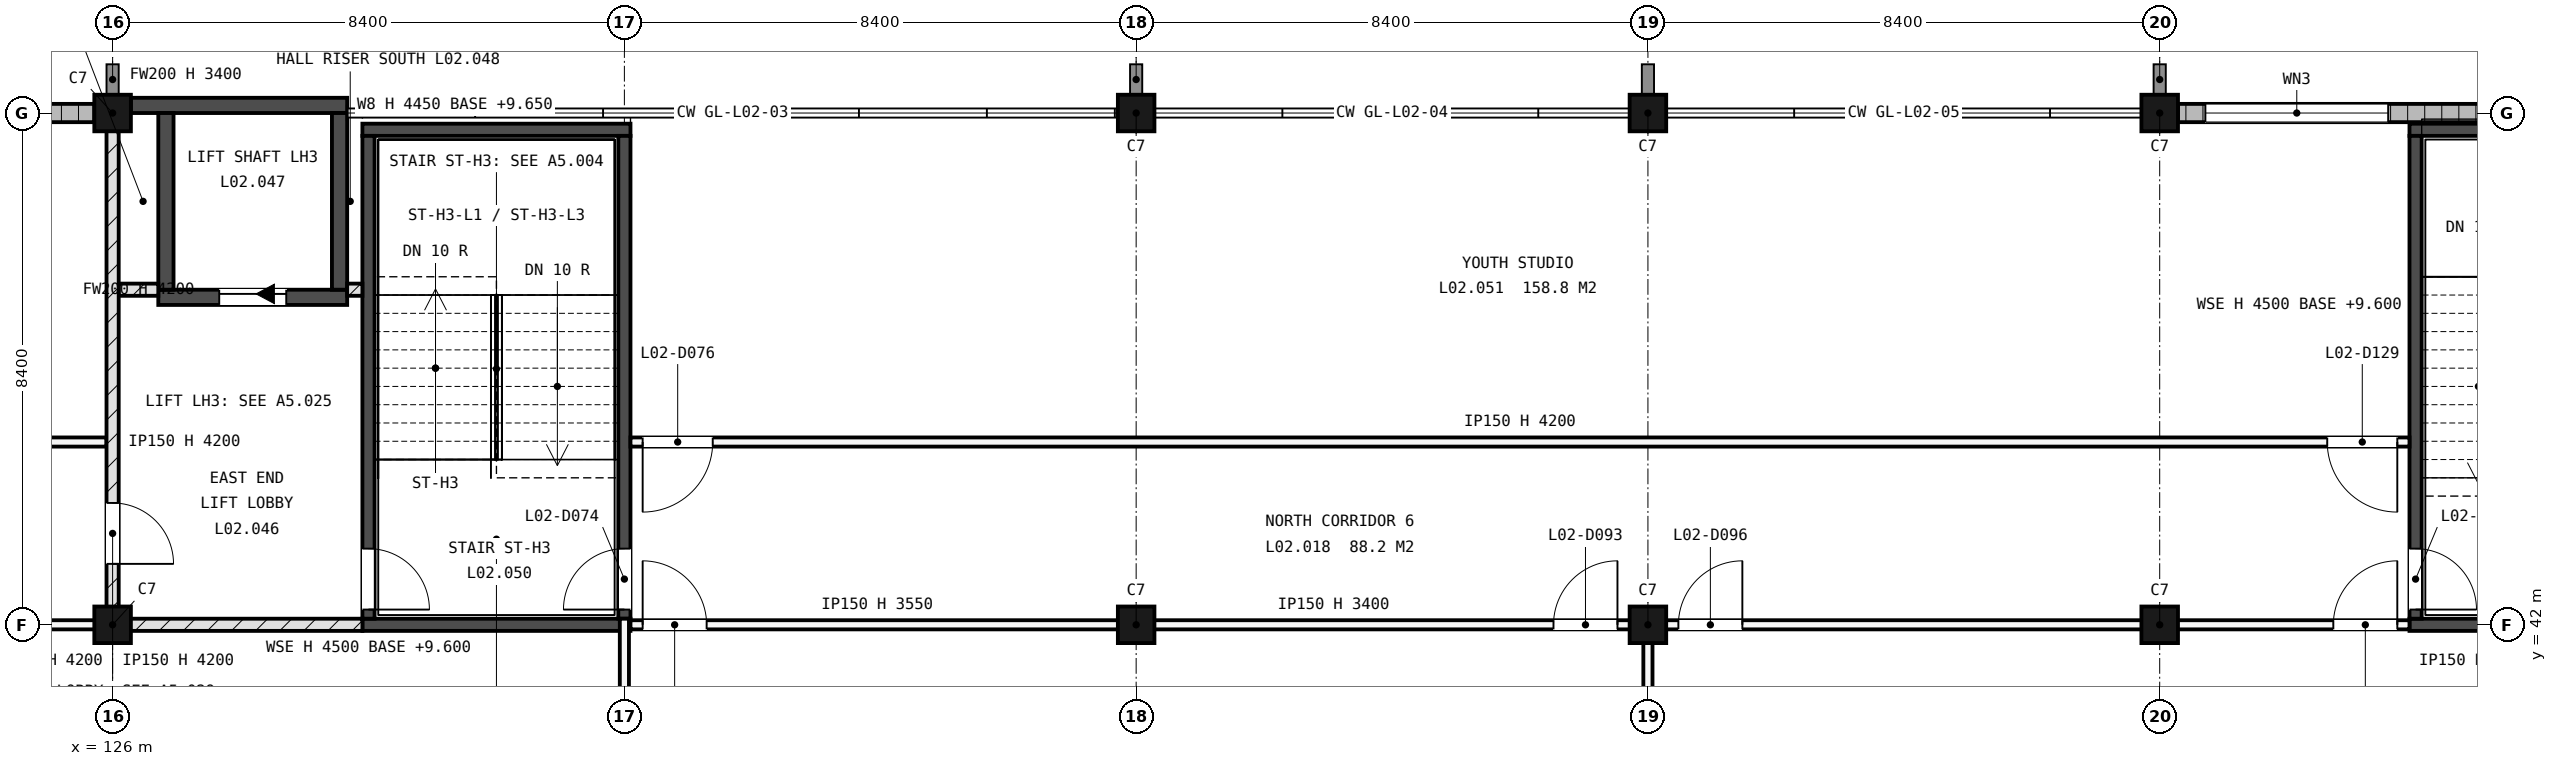
"""IFC4 building model, lengths in metres.
Left out: names, types, materials, properties, quantities, classifications, styles, units other than length and angle.
Written with IfcOpenShell. Run it as: python <this file> out.ifc"""

import sys

from ifc_helpers import new_model, si_unit, direction, frame, frame_2d, origin, origin_2d, place, context, subcontext, project, spatial, rectangle, extrude, element, fill, save


model = new_model("IFC4")
c1 = context("Model", 3, precision=1e-05, world=origin(), true_north=direction((0.0, 1.0)))
c2 = subcontext(c1, "Body", "Model", "MODEL_VIEW")
j1 = project(units=[si_unit("LENGTHUNIT", "METRE"), si_unit("PLANEANGLEUNIT", "RADIAN")], contexts=[c1])
p1 = place(None, origin())
s1 = spatial("IfcSite", under=j1, at=p1, CompositionType="ELEMENT")
p2 = place(p1, origin())
s2 = spatial("IfcBuilding", under=s1, at=p2, CompositionType="ELEMENT")
p3 = place(p2, frame((0.0, 0.0, 9.9)))
s3 = spatial("IfcBuildingStorey", under=s2, at=p3, CompositionType="ELEMENT", Elevation=9.9)
for number, where, z_axis, x_axis in (
    (1, (126.0, 42.0, -0.25), (0.0, 0.0, 1.0), (1.0, 0.0, 0.0)),
    (2, (126.0, 50.4, -0.25), (0.0, 0.0, 1.0), (1.0, 0.0, 0.0)),
    (3, (142.8, 42.0, -0.25), (0.0, 0.0, 1.0), (1.0, 0.0, 0.0)),
    (4, (142.8, 50.4, -0.25), (0.0, 0.0, 1.0), (1.0, 0.0, 0.0)),
    (5, (151.2, 42.0, -0.25), (0.0, 0.0, 1.0), (1.0, 0.0, 0.0)),
    (6, (151.2, 50.4, -0.25), (0.0, 0.0, 1.0), (1.0, 0.0, 0.0)),
    (7, (159.6, 42.0, -0.25), (0.0, 0.0, 1.0), (1.0, 0.0, 0.0)),
    (8, (159.6, 50.4, -0.25), (0.0, 0.0, 1.0), (1.0, 0.0, 0.0)),
):
    element("IfcColumn", number, at=place(p3, frame(where, z_axis=z_axis, x_axis=x_axis)), inside=s3, PredefinedType="COLUMN", context=c2, shape_type="SweptSolid", body=[
        extrude(rectangle(XDim=0.6, YDim=0.6, at=origin_2d()), origin(), (0.0, 0.0, 1.0), 4.45),
    ])
p4 = place(p3, frame((126.75, 47.375, -0.25), z_axis=(0.0, 0.0, 1.0), x_axis=(1.0, 0.0, 0.0)))
e9 = element("IfcWall", 9, at=p4, inside=s3, PredefinedType="SHEAR", context=c2, shape_type="SweptSolid", body=[
    extrude(rectangle(XDim=3.1, YDim=0.25, at=frame_2d((1.55, 0.0))), origin(), (0.0, 0.0, 1.0), 4.45),
])
p5 = place(p4, frame((1.0, 0.0, 0.25)))
e10 = element("IfcOpeningElement", 10, at=p5, cuts=e9, PredefinedType="OPENING", context=c2, shape_type="SweptSolid", body=[
    extrude(rectangle(XDim=1.1, YDim=2.1, at=frame_2d((0.55, 1.05))), frame((0.0, 0.135, 0.0), z_axis=(0.0, -1.0, 0.0), x_axis=(1.0, 0.0, 0.0)), (0.0, 0.0, 1.0), 0.27),
])
p6 = place(p3, frame((126.3, 50.525, -0.25), z_axis=(0.0, 0.0, 1.0), x_axis=(1.0, 0.0, 0.0)))
e11 = element("IfcWall", 11, at=p6, inside=s3, PredefinedType="SHEAR", context=c2, shape_type="SweptSolid", body=[
    extrude(rectangle(XDim=3.55, YDim=0.25, at=frame_2d((1.775, 0.0))), origin(), (0.0, 0.0, 1.0), 4.45),
])
for number, where, z_axis, x_axis in (
    (12, (126.875, 47.5, -0.25), (0.0, 0.0, 1.0), (0.0, 1.0, 0.0)),
    (13, (129.725, 47.5, -0.25), (0.0, 0.0, 1.0), (0.0, 1.0, 0.0)),
):
    element("IfcWall", number, at=place(p3, frame(where, z_axis=z_axis, x_axis=x_axis)), inside=s3, PredefinedType="SHEAR", context=c2, shape_type="SweptSolid", body=[
        extrude(rectangle(XDim=2.9, YDim=0.25, at=frame_2d((1.45, 0.0))), origin(), (0.0, 0.0, 1.0), 4.45),
    ])
p7 = place(p3, frame((109.5, 50.4, 0.0), z_axis=(0.0, 0.0, 1.0), x_axis=(1.0, 0.0, 0.0)))
e14 = element("IfcWall", 14, at=p7, inside=s3, PredefinedType="STANDARD", context=c2, shape_type="SweptSolid", body=[
    extrude(rectangle(XDim=16.2, YDim=0.3, at=frame_2d((8.1, 0.0))), origin(), (0.0, 0.0, 1.0), 3.55),
])
p8 = place(p7, frame((0.45, 0.0, 0.9)))
e15 = element("IfcOpeningElement", 15, at=p8, cuts=e14, PredefinedType="OPENING", context=c2, shape_type="SweptSolid", body=[
    extrude(rectangle(XDim=3.0, YDim=1.5, at=frame_2d((1.5, 0.75))), frame((0.0, 0.16, 0.0), z_axis=(0.0, -1.0, 0.0), x_axis=(1.0, 0.0, 0.0)), (0.0, 0.0, 1.0), 0.32),
])
p9 = place(p7, frame((10.05, 0.0, 0.9)))
e16 = element("IfcOpeningElement", 16, at=p9, cuts=e14, PredefinedType="OPENING", context=c2, shape_type="SweptSolid", body=[
    extrude(rectangle(XDim=4.2, YDim=1.5, at=frame_2d((2.1, 0.75))), frame((0.0, 0.16, 0.0), z_axis=(0.0, -1.0, 0.0), x_axis=(1.0, 0.0, 0.0)), (0.0, 0.0, 1.0), 0.32),
])
p10 = place(p3, frame((159.9, 50.4, 0.0), z_axis=(0.0, 0.0, 1.0), x_axis=(1.0, 0.0, 0.0)))
e17 = element("IfcWall", 17, at=p10, inside=s3, PredefinedType="STANDARD", context=c2, shape_type="SweptSolid", body=[
    extrude(rectangle(XDim=8.1, YDim=0.3, at=frame_2d((4.05, 0.0))), origin(), (0.0, 0.0, 1.0), 3.55),
])
p11 = place(p10, frame((0.45, 0.0, 0.9)))
e18 = element("IfcOpeningElement", 18, at=p11, cuts=e17, PredefinedType="OPENING", context=c2, shape_type="SweptSolid", body=[
    extrude(rectangle(XDim=3.0, YDim=1.5, at=frame_2d((1.5, 0.75))), frame((0.0, 0.16, 0.0), z_axis=(0.0, -1.0, 0.0), x_axis=(1.0, 0.0, 0.0)), (0.0, 0.0, 1.0), 0.32),
])
for number, where, z_axis, x_axis in (
    (19, (130.1, 42.0, -0.3), (0.0, 0.0, 1.0), (1.0, 0.0, 0.0)),
    (20, (130.1, 50.125, -0.3), (0.0, 0.0, 1.0), (1.0, 0.0, 0.0)),
):
    element("IfcWall", number, at=place(p3, frame(where, z_axis=z_axis, x_axis=x_axis)), inside=s3, PredefinedType="SHEAR", context=c2, shape_type="SweptSolid", body=[
        extrude(rectangle(XDim=4.4, YDim=0.2, at=frame_2d((2.2, 0.0))), origin(), (0.0, 0.0, 1.0), 4.5),
    ])
p12 = place(p3, frame((130.2, 42.1, -0.3), z_axis=(0.0, 0.0, 1.0), x_axis=(0.0, 1.0, 0.0)))
e21 = element("IfcWall", 21, at=p12, inside=s3, PredefinedType="SHEAR", context=c2, shape_type="SweptSolid", body=[
    extrude(rectangle(XDim=7.925, YDim=0.2, at=frame_2d((3.962, 0.0))), origin(), (0.0, 0.0, 1.0), 4.5),
])
p13 = place(p12, frame((0.15, 0.0, 0.3)))
e22 = element("IfcOpeningElement", 22, at=p13, cuts=e21, PredefinedType="OPENING", context=c2, shape_type="SweptSolid", body=[
    extrude(rectangle(XDim=1.0, YDim=2.1, at=frame_2d((0.5, 1.05))), frame((0.0, 0.11, 0.0), z_axis=(0.0, -1.0, 0.0), x_axis=(1.0, 0.0, 0.0)), (0.0, 0.0, 1.0), 0.22),
])
p14 = place(p3, frame((134.4, 42.1, -0.3), z_axis=(0.0, 0.0, 1.0), x_axis=(0.0, 1.0, 0.0)))
e23 = element("IfcWall", 23, at=p14, inside=s3, PredefinedType="SHEAR", context=c2, shape_type="SweptSolid", body=[
    extrude(rectangle(XDim=7.925, YDim=0.2, at=frame_2d((3.962, 0.0))), origin(), (0.0, 0.0, 1.0), 4.5),
])
p15 = place(p14, frame((0.15, 0.0, 0.3)))
e24 = element("IfcOpeningElement", 24, at=p15, cuts=e23, PredefinedType="OPENING", context=c2, shape_type="SweptSolid", body=[
    extrude(rectangle(XDim=1.0, YDim=2.1, at=frame_2d((0.5, 1.05))), frame((0.0, 0.11, 0.0), z_axis=(0.0, -1.0, 0.0), x_axis=(1.0, 0.0, 0.0)), (0.0, 0.0, 1.0), 0.22),
])
p16 = place(p3, frame((163.7, 42.0, -0.3), z_axis=(0.0, 0.0, 1.0), x_axis=(1.0, 0.0, 0.0)))
e25 = element("IfcWall", 25, at=p16, inside=s3, PredefinedType="SHEAR", context=c2, shape_type="SweptSolid", body=[
    extrude(rectangle(XDim=4.125, YDim=0.2, at=frame_2d((2.062, 0.0))), origin(), (0.0, 0.0, 1.0), 4.5),
])
p17 = place(p3, frame((163.7, 50.125, -0.3), z_axis=(0.0, 0.0, 1.0), x_axis=(1.0, 0.0, 0.0)))
e26 = element("IfcWall", 26, at=p17, inside=s3, PredefinedType="SHEAR", context=c2, shape_type="SweptSolid", body=[
    extrude(rectangle(XDim=1.15, YDim=0.2, at=frame_2d((0.575, 0.0))), origin(), (0.0, 0.0, 1.0), 4.5),
])
p18 = place(p3, frame((163.8, 42.1, -0.3), z_axis=(0.0, 0.0, 1.0), x_axis=(0.0, 1.0, 0.0)))
e27 = element("IfcWall", 27, at=p18, inside=s3, PredefinedType="SHEAR", context=c2, shape_type="SweptSolid", body=[
    extrude(rectangle(XDim=7.925, YDim=0.2, at=frame_2d((3.962, 0.0))), origin(), (0.0, 0.0, 1.0), 4.5),
])
p19 = place(p18, frame((0.15, 0.0, 0.3)))
e28 = element("IfcOpeningElement", 28, at=p19, cuts=e27, PredefinedType="OPENING", context=c2, shape_type="SweptSolid", body=[
    extrude(rectangle(XDim=1.0, YDim=2.1, at=frame_2d((0.5, 1.05))), frame((0.0, 0.11, 0.0), z_axis=(0.0, -1.0, 0.0), x_axis=(1.0, 0.0, 0.0)), (0.0, 0.0, 1.0), 0.22),
])
p20 = place(p3, frame((117.7, 42.0, 0.0), z_axis=(0.0, 0.0, 1.0), x_axis=(1.0, 0.0, 0.0)))
e29 = element("IfcWall", 29, at=p20, inside=s3, PredefinedType="PARTITIONING", context=c2, shape_type="SweptSolid", body=[
    extrude(rectangle(XDim=8.3, YDim=0.15, at=frame_2d((4.15, 0.0))), origin(), (0.0, 0.0, 1.0), 4.2),
])
p21 = place(p3, frame((126.0, 42.0, 0.0), z_axis=(0.0, 0.0, 1.0), x_axis=(1.0, 0.0, 0.0)))
e30 = element("IfcWall", 30, at=p21, inside=s3, PredefinedType="SOLIDWALL", context=c2, shape_type="SweptSolid", body=[
    extrude(rectangle(XDim=4.1, YDim=0.2, at=frame_2d((2.05, 0.0))), origin(), (0.0, 0.0, 1.0), 4.2),
])
p22 = place(p3, frame((134.5, 42.0, 0.0), z_axis=(0.0, 0.0, 1.0), x_axis=(1.0, 0.0, 0.0)))
e31 = element("IfcWall", 31, at=p22, inside=s3, PredefinedType="PARTITIONING", context=c2, shape_type="SweptSolid", body=[
    extrude(rectangle(XDim=8.1, YDim=0.15, at=frame_2d((4.05, 0.0))), origin(), (0.0, 0.0, 1.0), 3.55),
])
p23 = place(p22, frame((0.2, 0.0, 0.0)))
e32 = element("IfcOpeningElement", 32, at=p23, cuts=e31, PredefinedType="OPENING", context=c2, shape_type="SweptSolid", body=[
    extrude(rectangle(XDim=1.05, YDim=2.1, at=frame_2d((0.525, 1.05))), frame((0.0, 0.085, 0.0), z_axis=(0.0, -1.0, 0.0), x_axis=(1.0, 0.0, 0.0)), (0.0, 0.0, 1.0), 0.17),
])
p24 = place(p3, frame((142.6, 42.0, 0.0), z_axis=(0.0, 0.0, 1.0), x_axis=(1.0, 0.0, 0.0)))
e33 = element("IfcWall", 33, at=p24, inside=s3, PredefinedType="PARTITIONING", context=c2, shape_type="SweptSolid", body=[
    extrude(rectangle(XDim=17.2, YDim=0.15, at=frame_2d((8.6, 0.0))), origin(), (0.0, 0.0, 1.0), 3.4),
])
p25 = place(p24, frame((7.05, 0.0, 0.0)))
e34 = element("IfcOpeningElement", 34, at=p25, cuts=e33, PredefinedType="OPENING", context=c2, shape_type="SweptSolid", body=[
    extrude(rectangle(XDim=1.05, YDim=2.1, at=frame_2d((0.525, 1.05))), frame((0.0, 0.085, 0.0), z_axis=(0.0, -1.0, 0.0), x_axis=(1.0, 0.0, 0.0)), (0.0, 0.0, 1.0), 0.17),
])
p26 = place(p24, frame((9.1, 0.0, 0.0)))
e35 = element("IfcOpeningElement", 35, at=p26, cuts=e33, PredefinedType="OPENING", context=c2, shape_type="SweptSolid", body=[
    extrude(rectangle(XDim=1.05, YDim=2.1, at=frame_2d((0.525, 1.05))), frame((0.0, 0.085, 0.0), z_axis=(0.0, -1.0, 0.0), x_axis=(1.0, 0.0, 0.0)), (0.0, 0.0, 1.0), 0.17),
])
p27 = place(p3, frame((159.8, 42.0, 0.0), z_axis=(0.0, 0.0, 1.0), x_axis=(1.0, 0.0, 0.0)))
e36 = element("IfcWall", 36, at=p27, inside=s3, PredefinedType="PARTITIONING", context=c2, shape_type="SweptSolid", body=[
    extrude(rectangle(XDim=3.9, YDim=0.15, at=frame_2d((1.95, 0.0))), origin(), (0.0, 0.0, 1.0), 3.55),
])
p28 = place(p27, frame((2.65, 0.0, 0.0)))
e37 = element("IfcOpeningElement", 37, at=p28, cuts=e36, PredefinedType="OPENING", context=c2, shape_type="SweptSolid", body=[
    extrude(rectangle(XDim=1.05, YDim=2.1, at=frame_2d((0.525, 1.05))), frame((0.0, 0.085, 0.0), z_axis=(0.0, -1.0, 0.0), x_axis=(1.0, 0.0, 0.0)), (0.0, 0.0, 1.0), 0.17),
])
p29 = place(p3, frame((117.7, 45.0, 0.0), z_axis=(0.0, 0.0, 1.0), x_axis=(1.0, 0.0, 0.0)))
e38 = element("IfcWall", 38, at=p29, inside=s3, PredefinedType="PARTITIONING", context=c2, shape_type="SweptSolid", body=[
    extrude(rectangle(XDim=8.2, YDim=0.15, at=frame_2d((4.1, 0.0))), origin(), (0.0, 0.0, 1.0), 4.2),
])
p30 = place(p29, frame((3.575, 0.0, 0.0)))
e39 = element("IfcOpeningElement", 39, at=p30, cuts=e38, PredefinedType="OPENING", context=c2, shape_type="SweptSolid", body=[
    extrude(rectangle(XDim=1.05, YDim=2.1, at=frame_2d((0.525, 1.05))), frame((0.0, 0.085, 0.0), z_axis=(0.0, -1.0, 0.0), x_axis=(1.0, 0.0, 0.0)), (0.0, 0.0, 1.0), 0.17),
])
p31 = place(p3, frame((134.5, 45.0, 0.0), z_axis=(0.0, 0.0, 1.0), x_axis=(1.0, 0.0, 0.0)))
e40 = element("IfcWall", 40, at=p31, inside=s3, PredefinedType="PARTITIONING", context=c2, shape_type="SweptSolid", body=[
    extrude(rectangle(XDim=29.2, YDim=0.15, at=frame_2d((14.6, 0.0))), origin(), (0.0, 0.0, 1.0), 4.2),
])
p32 = place(p31, frame((0.2, 0.0, 0.0)))
e41 = element("IfcOpeningElement", 41, at=p32, cuts=e40, PredefinedType="OPENING", context=c2, shape_type="SweptSolid", body=[
    extrude(rectangle(XDim=1.15, YDim=2.1, at=frame_2d((0.575, 1.05))), frame((0.0, 0.085, 0.0), z_axis=(0.0, -1.0, 0.0), x_axis=(1.0, 0.0, 0.0)), (0.0, 0.0, 1.0), 0.17),
])
p33 = place(p31, frame((27.85, 0.0, 0.0)))
e42 = element("IfcOpeningElement", 42, at=p33, cuts=e40, PredefinedType="OPENING", context=c2, shape_type="SweptSolid", body=[
    extrude(rectangle(XDim=1.15, YDim=2.1, at=frame_2d((0.575, 1.05))), frame((0.0, 0.085, 0.0), z_axis=(0.0, -1.0, 0.0), x_axis=(1.0, 0.0, 0.0)), (0.0, 0.0, 1.0), 0.17),
])
p34 = place(p3, frame((126.1, 47.5, 0.0), z_axis=(0.0, 0.0, 1.0), x_axis=(1.0, 0.0, 0.0)))
e43 = element("IfcWall", 43, at=p34, inside=s3, PredefinedType="SOLIDWALL", context=c2, shape_type="SweptSolid", body=[
    extrude(rectangle(XDim=0.65, YDim=0.2, at=frame_2d((0.325, 0.0))), origin(), (0.0, 0.0, 1.0), 4.2),
])
p35 = place(p3, frame((129.85, 47.5, 0.0), z_axis=(0.0, 0.0, 1.0), x_axis=(1.0, 0.0, 0.0)))
e44 = element("IfcWall", 44, at=p35, inside=s3, PredefinedType="SOLIDWALL", context=c2, shape_type="SweptSolid", body=[
    extrude(rectangle(XDim=0.25, YDim=0.2, at=frame_2d((0.125, 0.0))), origin(), (0.0, 0.0, 1.0), 4.2),
])
p36 = place(p3, frame((126.0, 42.1, 0.0), z_axis=(0.0, 0.0, 1.0), x_axis=(0.0, 1.0, 0.0)))
e45 = element("IfcWall", 45, at=p36, inside=s3, PredefinedType="SOLIDWALL", context=c2, shape_type="SweptSolid", body=[
    extrude(rectangle(XDim=8.3, YDim=0.2, at=frame_2d((4.15, 0.0))), origin(), (0.0, 0.0, 1.0), 3.4),
])
p37 = place(p36, frame((0.9, 0.0, 0.0)))
e46 = element("IfcOpeningElement", 46, at=p37, cuts=e45, PredefinedType="OPENING", context=c2, shape_type="SweptSolid", body=[
    extrude(rectangle(XDim=1.0, YDim=2.1, at=frame_2d((0.5, 1.05))), frame((0.0, 0.11, 0.0), z_axis=(0.0, -1.0, 0.0), x_axis=(1.0, 0.0, 0.0)), (0.0, 0.0, 1.0), 0.22),
])
p38 = place(p3, frame((134.4, 33.32, 0.0), z_axis=(0.0, 0.0, 1.0), x_axis=(0.0, 1.0, 0.0)))
e47 = element("IfcWall", 47, at=p38, inside=s3, PredefinedType="PARTITIONING", context=c2, shape_type="SweptSolid", body=[
    extrude(rectangle(XDim=8.78, YDim=0.15, at=frame_2d((4.39, 0.0))), origin(), (0.0, 0.0, 1.0), 4.2),
])
p39 = place(p3, frame((151.2, 27.675, 0.0), z_axis=(0.0, 0.0, 1.0), x_axis=(0.0, 1.0, 0.0)))
e48 = element("IfcWall", 48, at=p39, inside=s3, PredefinedType="PARTITIONING", context=c2, shape_type="SweptSolid", body=[
    extrude(rectangle(XDim=14.25, YDim=0.15, at=frame_2d((7.125, 0.0))), origin(), (0.0, 0.0, 1.0), 3.4),
])
p40 = place(p11, origin())
e49 = element("IfcWindow", 49, at=p40, inside=s3, PartitioningType="SINGLE_PANEL", PredefinedType="WINDOW", context=c2, shape_type="SweptSolid", body=[
    extrude(rectangle(XDim=3.0, YDim=1.5, at=frame_2d((1.5, 0.75))), frame((0.0, 0.03, 0.0), z_axis=(0.0, -1.0, 0.0), x_axis=(1.0, 0.0, 0.0)), (0.0, 0.0, 1.0), 0.06),
])
fill(e18, e49)
p41 = place(p5, origin())
e50 = element("IfcDoor", 50, at=p41, inside=s3, OperationType="SLIDING_TO_LEFT", PredefinedType="DOOR", context=c2, shape_type="SweptSolid", body=[
    extrude(rectangle(XDim=1.1, YDim=2.1, at=frame_2d((0.55, 1.05))), frame((0.0, 0.025, 0.0), z_axis=(0.0, -1.0, 0.0), x_axis=(1.0, 0.0, 0.0)), (0.0, 0.0, 1.0), 0.05),
])
fill(e10, e50)
p42 = place(p13, origin())
e51 = element("IfcDoor", 51, at=p42, inside=s3, OperationType="SINGLE_SWING_LEFT", PredefinedType="DOOR", context=c2, shape_type="SweptSolid", body=[
    extrude(rectangle(XDim=1.0, YDim=2.1, at=frame_2d((0.5, 1.05))), frame((0.0, 0.025, 0.0), z_axis=(0.0, -1.0, 0.0), x_axis=(1.0, 0.0, 0.0)), (0.0, 0.0, 1.0), 0.05),
])
fill(e22, e51)
p43 = place(p15, origin())
e52 = element("IfcDoor", 52, at=p43, inside=s3, OperationType="SINGLE_SWING_RIGHT", PredefinedType="DOOR", context=c2, shape_type="SweptSolid", body=[
    extrude(rectangle(XDim=1.0, YDim=2.1, at=frame_2d((0.5, 1.05))), frame((0.0, 0.025, 0.0), z_axis=(0.0, -1.0, 0.0), x_axis=(1.0, 0.0, 0.0)), (0.0, 0.0, 1.0), 0.05),
])
fill(e24, e52)
p44 = place(p19, origin())
e53 = element("IfcDoor", 53, at=p44, inside=s3, OperationType="SINGLE_SWING_LEFT", PredefinedType="DOOR", context=c2, shape_type="SweptSolid", body=[
    extrude(rectangle(XDim=1.0, YDim=2.1, at=frame_2d((0.5, 1.05))), frame((0.0, 0.025, 0.0), z_axis=(0.0, -1.0, 0.0), x_axis=(1.0, 0.0, 0.0)), (0.0, 0.0, 1.0), 0.05),
])
fill(e28, e53)
p45 = place(p23, origin())
e54 = element("IfcDoor", 54, at=p45, inside=s3, OperationType="SINGLE_SWING_RIGHT", PredefinedType="DOOR", context=c2, shape_type="SweptSolid", body=[
    extrude(rectangle(XDim=1.05, YDim=2.1, at=frame_2d((0.525, 1.05))), frame((0.0, 0.025, 0.0), z_axis=(0.0, -1.0, 0.0), x_axis=(1.0, 0.0, 0.0)), (0.0, 0.0, 1.0), 0.05),
])
fill(e32, e54)
p46 = place(p25, origin())
e55 = element("IfcDoor", 55, at=p46, inside=s3, OperationType="SINGLE_SWING_LEFT", PredefinedType="DOOR", context=c2, shape_type="SweptSolid", body=[
    extrude(rectangle(XDim=1.05, YDim=2.1, at=frame_2d((0.525, 1.05))), frame((0.0, 0.025, 0.0), z_axis=(0.0, -1.0, 0.0), x_axis=(1.0, 0.0, 0.0)), (0.0, 0.0, 1.0), 0.05),
])
fill(e34, e55)
p47 = place(p26, origin())
e56 = element("IfcDoor", 56, at=p47, inside=s3, OperationType="SINGLE_SWING_LEFT", PredefinedType="DOOR", context=c2, shape_type="SweptSolid", body=[
    extrude(rectangle(XDim=1.05, YDim=2.1, at=frame_2d((0.525, 1.05))), frame((0.0, 0.025, 0.0), z_axis=(0.0, -1.0, 0.0), x_axis=(1.0, 0.0, 0.0)), (0.0, 0.0, 1.0), 0.05),
])
fill(e35, e56)
p48 = place(p28, origin())
e57 = element("IfcDoor", 57, at=p48, inside=s3, OperationType="SINGLE_SWING_LEFT", PredefinedType="DOOR", context=c2, shape_type="SweptSolid", body=[
    extrude(rectangle(XDim=1.05, YDim=2.1, at=frame_2d((0.525, 1.05))), frame((0.0, 0.025, 0.0), z_axis=(0.0, -1.0, 0.0), x_axis=(1.0, 0.0, 0.0)), (0.0, 0.0, 1.0), 0.05),
])
fill(e37, e57)
p49 = place(p32, origin())
e58 = element("IfcDoor", 58, at=p49, inside=s3, OperationType="SINGLE_SWING_LEFT", PredefinedType="DOOR", context=c2, shape_type="SweptSolid", body=[
    extrude(rectangle(XDim=1.15, YDim=2.1, at=frame_2d((0.575, 1.05))), frame((0.0, 0.025, 0.0), z_axis=(0.0, -1.0, 0.0), x_axis=(1.0, 0.0, 0.0)), (0.0, 0.0, 1.0), 0.05),
])
fill(e41, e58)
p50 = place(p33, origin())
e59 = element("IfcDoor", 59, at=p50, inside=s3, OperationType="SINGLE_SWING_RIGHT", PredefinedType="DOOR", context=c2, shape_type="SweptSolid", body=[
    extrude(rectangle(XDim=1.15, YDim=2.1, at=frame_2d((0.575, 1.05))), frame((0.0, 0.025, 0.0), z_axis=(0.0, -1.0, 0.0), x_axis=(1.0, 0.0, 0.0)), (0.0, 0.0, 1.0), 0.05),
])
fill(e42, e59)
p51 = place(p37, origin())
e60 = element("IfcDoor", 60, at=p51, inside=s3, OperationType="SINGLE_SWING_LEFT", PredefinedType="DOOR", context=c2, shape_type="SweptSolid", body=[
    extrude(rectangle(XDim=1.0, YDim=2.1, at=frame_2d((0.5, 1.05))), frame((0.0, 0.025, 0.0), z_axis=(0.0, -1.0, 0.0), x_axis=(1.0, 0.0, 0.0)), (0.0, 0.0, 1.0), 0.05),
])
fill(e46, e60)
save(model, sys.argv[1])
